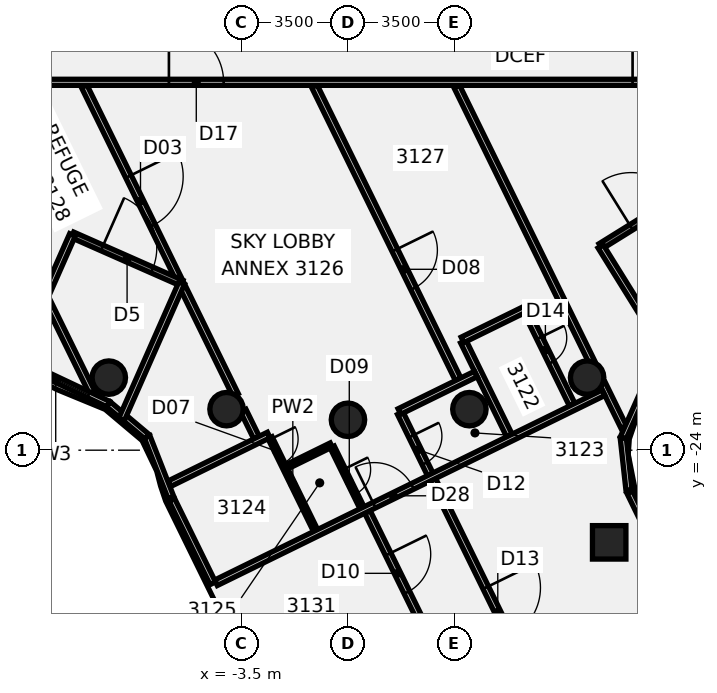
"""IFC4 building model, lengths in metres.
Left out: names, types, materials, properties, quantities, classifications, styles, units other than length and angle.
Written with IfcOpenShell. Run it as: python <this file> out.ifc"""

import sys

from ifc_helpers import new_model, si_unit, direction, frame, frame_2d, origin, origin_2d, place, context, subcontext, project, spatial, rectangle, circle, extrude, element, fill, save


model = new_model("IFC4")
c1 = context("Model", 3, precision=1e-05, world=origin(), true_north=direction((0.0, 1.0)))
c2 = subcontext(c1, "Body", "Model", "MODEL_VIEW")
j1 = project(units=[si_unit("LENGTHUNIT", "METRE"), si_unit("PLANEANGLEUNIT", "RADIAN")], contexts=[c1])
p1 = place(None, origin())
s1 = spatial("IfcSite", under=j1, at=p1, CompositionType="ELEMENT")
p2 = place(p1, origin())
s2 = spatial("IfcBuilding", under=s1, at=p2, CompositionType="ELEMENT")
p3 = place(p2, frame((0.0, 0.0, 128.5)))
s3 = spatial("IfcBuildingStorey", under=s2, at=p3, CompositionType="ELEMENT", Elevation=128.5)
for number, where, z_axis, x_axis in (
    (1, (-7.866, -21.613, -0.18), (0.0, 0.0, 1.0), (1.0, 0.0, 0.0)),
    (2, (-3.994, -22.651, -0.18), (0.0, 0.0, 1.0), (1.0, 0.0, 0.0)),
    (3, (0.0, -23.0, -0.18), (0.0, 0.0, 1.0), (1.0, 0.0, 0.0)),
    (4, (3.994, -22.651, -0.18), (0.0, 0.0, 1.0), (1.0, 0.0, 0.0)),
    (5, (7.866, -21.613, -0.18), (0.0, 0.0, 1.0), (1.0, 0.0, 0.0)),
):
    element("IfcColumn", number, at=place(p3, frame(where, z_axis=z_axis, x_axis=x_axis)), inside=s3, PredefinedType="COLUMN", context=c2, shape_type="SweptSolid", body=[
        extrude(circle(Radius=0.55, at=origin_2d()), origin(), (0.0, 0.0, 1.0), 4.54),
    ])
p4 = place(p3, frame((8.593, -27.031, -0.176), z_axis=(0.019865586913, 0.034670563609, 0.999201336306), x_axis=(-0.897427963586, -0.439917045338, 0.033106546108)))
e6 = element("IfcColumn", 6, at=p4, inside=s3, PredefinedType="COLUMN", context=c2, shape_type="SweptSolid", body=[
    extrude(rectangle(XDim=1.1, YDim=1.1, at=origin_2d()), origin(), (0.0, 0.0, 1.0), 4.535),
])
p5 = place(p3, frame((-12.961, -12.83, 0.0), z_axis=(0.0, 0.0, 1.0), x_axis=(0.44020582269, -0.897896894788, 0.0)))
e7 = element("IfcWall", 7, at=p5, inside=s3, PredefinedType="PARTITIONING", context=c2, shape_type="SweptSolid", body=[
    extrude(rectangle(XDim=10.402, YDim=0.2, at=frame_2d((5.201, 0.0))), origin(), (0.0, 0.0, 1.0), 3.66),
])
p6 = place(p3, frame((-8.677, -12.026, 0.0), z_axis=(0.0, 0.0, 1.0), x_axis=(0.440258895861, -0.897870873018, 0.0)))
e8 = element("IfcWall", 8, at=p6, inside=s3, PredefinedType="PARTITIONING", context=c2, shape_type="SweptSolid", body=[
    extrude(rectangle(XDim=11.312, YDim=0.2, at=frame_2d((5.656, 0.0))), origin(), (0.0, 0.0, 1.0), 3.66),
])
p7 = place(p6, frame((3.31, 0.0, 0.0)))
e9 = element("IfcOpeningElement", 9, at=p7, cuts=e8, PredefinedType="OPENING", context=c2, shape_type="SweptSolid", body=[
    extrude(rectangle(XDim=1.8, YDim=2.1, at=frame_2d((0.9, 1.05))), frame((0.0, 0.11, 0.0), z_axis=(0.0, -1.0, 0.0), x_axis=(1.0, 0.0, 0.0)), (0.0, 0.0, 1.0), 0.22),
])
p8 = place(p3, frame((-3.446, -22.695, 0.0), z_axis=(0.0, 0.0, 1.0), x_axis=(0.440211677145, -0.89789402454, 0.0)))
e10 = element("IfcWall", 10, at=p8, inside=s3, PredefinedType="PARTITIONING", context=c2, shape_type="SweptSolid", body=[
    extrude(rectangle(XDim=0.992, YDim=0.2, at=frame_2d((0.496, 0.0))), origin(), (0.0, 0.0, 1.0), 3.66),
])
p9 = place(p3, frame((-2.562, -23.59, 0.0), z_axis=(0.0, 0.0, 1.0), x_axis=(0.440221907821, -0.897889008661, 0.0)))
e11 = element("IfcWall", 11, at=p9, inside=s3, PredefinedType="PARTITIONING", context=c2, shape_type="SweptSolid", body=[
    extrude(rectangle(XDim=3.401, YDim=0.15, at=frame_2d((1.7, 0.0))), origin(), (0.0, 0.0, 1.0), 3.66),
])
p10 = place(p9, frame((0.05, 0.0, 0.0)))
e12 = element("IfcOpeningElement", 12, at=p10, cuts=e11, PredefinedType="OPENING", context=c2, shape_type="SweptSolid", body=[
    extrude(rectangle(XDim=0.9, YDim=2.1, at=frame_2d((0.45, 1.05))), frame((0.0, 0.085, 0.0), z_axis=(0.0, -1.0, 0.0), x_axis=(1.0, 0.0, 0.0)), (0.0, 0.0, 1.0), 0.17),
])
p11 = place(p3, frame((-1.104, -12.026, 0.0), z_axis=(0.0, 0.0, 1.0), x_axis=(0.44028770211, -0.897856747689, 0.0)))
e13 = element("IfcWall", 13, at=p11, inside=s3, PredefinedType="PARTITIONING", context=c2, shape_type="SweptSolid", body=[
    extrude(rectangle(XDim=10.737, YDim=0.2, at=frame_2d((5.368, 0.0))), origin(), (0.0, 0.0, 1.0), 3.66),
])
p12 = place(p11, frame((6.01, 0.0, 0.0)))
e14 = element("IfcOpeningElement", 14, at=p12, cuts=e13, PredefinedType="OPENING", context=c2, shape_type="SweptSolid", body=[
    extrude(rectangle(XDim=1.4, YDim=2.1, at=frame_2d((0.7, 1.05))), frame((0.0, 0.11, 0.0), z_axis=(0.0, -1.0, 0.0), x_axis=(1.0, 0.0, 0.0)), (0.0, 0.0, 1.0), 0.22),
])
p13 = place(p3, frame((-0.518, -23.896, 0.0), z_axis=(0.0, 0.0, 1.0), x_axis=(0.440354919773, -0.897823782616, 0.0)))
e15 = element("IfcWall", 15, at=p13, inside=s3, PredefinedType="PARTITIONING", context=c2, shape_type="SweptSolid", body=[
    extrude(rectangle(XDim=2.225, YDim=0.15, at=frame_2d((1.113, 0.0))), origin(), (0.0, 0.0, 1.0), 3.66),
])
p14 = place(p13, frame((0.825, 0.0, 0.0)))
e16 = element("IfcOpeningElement", 16, at=p14, cuts=e15, PredefinedType="OPENING", context=c2, shape_type="SweptSolid", body=[
    extrude(rectangle(XDim=0.9, YDim=2.1, at=frame_2d((0.45, 1.05))), frame((0.0, 0.085, 0.0), z_axis=(0.0, -1.0, 0.0), x_axis=(1.0, 0.0, 0.0)), (0.0, 0.0, 1.0), 0.17),
])
p15 = place(p3, frame((0.64, -26.03, 0.0), z_axis=(0.0, 0.0, 1.0), x_axis=(0.440242212753, -0.897879053164, 0.0)))
e17 = element("IfcWall", 17, at=p15, inside=s3, PredefinedType="PARTITIONING", context=c2, shape_type="SweptSolid", body=[
    extrude(rectangle(XDim=3.86, YDim=0.2, at=frame_2d((1.93, 0.0))), origin(), (0.0, 0.0, 1.0), 3.66),
])
p16 = place(p15, frame((1.55, 0.0, 0.0)))
e18 = element("IfcOpeningElement", 18, at=p16, cuts=e17, PredefinedType="OPENING", context=c2, shape_type="SweptSolid", body=[
    extrude(rectangle(XDim=1.4, YDim=2.1, at=frame_2d((0.7, 1.05))), frame((0.0, 0.11, 0.0), z_axis=(0.0, -1.0, 0.0), x_axis=(1.0, 0.0, 0.0)), (0.0, 0.0, 1.0), 0.22),
])
p17 = place(p3, frame((1.72, -22.783, 0.0), z_axis=(0.0, 0.0, 1.0), x_axis=(0.440033133993, -0.897981537109, 0.0)))
e19 = element("IfcWall", 19, at=p17, inside=s3, PredefinedType="PARTITIONING", context=c2, shape_type="SweptSolid", body=[
    extrude(rectangle(XDim=15.74, YDim=0.2, at=frame_2d((7.87, 0.0))), origin(), (0.0, 0.0, 1.0), 3.66),
])
p18 = place(p17, frame((0.84, 0.0, 0.0)))
e20 = element("IfcOpeningElement", 20, at=p18, cuts=e19, PredefinedType="OPENING", context=c2, shape_type="SweptSolid", body=[
    extrude(rectangle(XDim=1.0, YDim=2.1, at=frame_2d((0.5, 1.05))), frame((0.0, 0.11, 0.0), z_axis=(0.0, -1.0, 0.0), x_axis=(1.0, 0.0, 0.0)), (0.0, 0.0, 1.0), 0.22),
])
p19 = place(p17, frame((6.39, 0.0, 0.0)))
e21 = element("IfcOpeningElement", 21, at=p19, cuts=e19, PredefinedType="OPENING", context=c2, shape_type="SweptSolid", body=[
    extrude(rectangle(XDim=1.8, YDim=2.1, at=frame_2d((0.9, 1.05))), frame((0.0, 0.11, 0.0), z_axis=(0.0, -1.0, 0.0), x_axis=(1.0, 0.0, 0.0)), (0.0, 0.0, 1.0), 0.22),
])
p20 = place(p3, frame((3.573, -12.026, 0.0), z_axis=(0.0, 0.0, 1.0), x_axis=(0.440287137064, -0.897857024774, 0.0)))
e22 = element("IfcWall", 22, at=p20, inside=s3, PredefinedType="PARTITIONING", context=c2, shape_type="SweptSolid", body=[
    extrude(rectangle(XDim=10.1, YDim=0.2, at=frame_2d((5.05, 0.0))), origin(), (0.0, 0.0, 1.0), 3.66),
])
p21 = place(p3, frame((8.373, -21.813, 0.0), z_axis=(0.0, 0.0, 1.0), x_axis=(0.440361746676, -0.897820434199, 0.0)))
e23 = element("IfcWall", 23, at=p21, inside=s3, PredefinedType="PARTITIONING", context=c2, shape_type="SweptSolid", body=[
    extrude(rectangle(XDim=1.585, YDim=0.2, at=frame_2d((0.792, 0.0))), origin(), (0.0, 0.0, 1.0), 3.66),
])
p22 = place(p3, frame((3.795, -20.429, 0.0), z_axis=(0.0, 0.0, 1.0), x_axis=(0.440215566353, -0.897892117763, 0.0)))
e24 = element("IfcWall", 24, at=p22, inside=s3, PredefinedType="PARTITIONING", context=c2, shape_type="SweptSolid", body=[
    extrude(rectangle(XDim=3.44, YDim=0.2, at=frame_2d((1.72, 0.0))), origin(), (0.0, 0.0, 1.0), 3.66),
])
p23 = place(p3, frame((5.878, -19.452, 0.0), z_axis=(0.0, 0.0, 1.0), x_axis=(0.440363832192, -0.897819411295, 0.0)))
e25 = element("IfcWall", 25, at=p23, inside=s3, PredefinedType="PARTITIONING", context=c2, shape_type="SweptSolid", body=[
    extrude(rectangle(XDim=3.4, YDim=0.2, at=frame_2d((1.7, 0.0))), origin(), (0.0, 0.0, 1.0), 3.66),
])
p24 = place(p23, frame((0.95, 0.0, 0.0)))
e26 = element("IfcOpeningElement", 26, at=p24, cuts=e25, PredefinedType="OPENING", context=c2, shape_type="SweptSolid", body=[
    extrude(rectangle(XDim=0.9, YDim=2.1, at=frame_2d((0.45, 1.05))), frame((0.0, 0.11, 0.0), z_axis=(0.0, -1.0, 0.0), x_axis=(1.0, 0.0, 0.0)), (0.0, 0.0, 1.0), 0.22),
])
p25 = place(p3, frame((-17.1, -11.9, 0.0), z_axis=(0.0, 0.0, 1.0), x_axis=(1.0, 0.0, 0.0)))
e27 = element("IfcWall", 27, at=p25, inside=s3, PredefinedType="PARTITIONING", context=c2, shape_type="SweptSolid", body=[
    extrude(rectangle(XDim=34.145, YDim=0.2, at=frame_2d((17.073, 0.0))), origin(), (0.0, 0.0, 1.0), 3.66),
])
p26 = place(p25, frame((11.211, 0.0, 0.0)))
e28 = element("IfcOpeningElement", 28, at=p26, cuts=e27, PredefinedType="OPENING", context=c2, shape_type="SweptSolid", body=[
    extrude(rectangle(XDim=1.8, YDim=2.1, at=frame_2d((0.9, 1.05))), frame((0.0, 0.11, 0.0), z_axis=(0.0, -1.0, 0.0), x_axis=(1.0, 0.0, 0.0)), (0.0, 0.0, 1.0), 0.22),
])
p27 = place(p25, frame((2.1, 0.0, 0.0)))
e29 = element("IfcOpeningElement", 29, at=p27, cuts=e27, PredefinedType="OPENING", context=c2, shape_type="SweptSolid", body=[
    extrude(rectangle(XDim=1.8, YDim=2.1, at=frame_2d((0.9, 1.05))), frame((0.0, 0.11, 0.0), z_axis=(0.0, -1.0, 0.0), x_axis=(1.0, 0.0, 0.0)), (0.0, 0.0, 1.0), 0.22),
])
p28 = place(p25, frame((26.462, 0.0, 0.0)))
e30 = element("IfcOpeningElement", 30, at=p28, cuts=e27, PredefinedType="OPENING", context=c2, shape_type="SweptSolid", body=[
    extrude(rectangle(XDim=1.8, YDim=2.1, at=frame_2d((0.9, 1.05))), frame((0.0, 0.11, 0.0), z_axis=(0.0, -1.0, 0.0), x_axis=(1.0, 0.0, 0.0)), (0.0, 0.0, 1.0), 0.22),
])
p29 = place(p3, frame((-5.87, -25.102, 0.0), z_axis=(0.0, 0.0, 1.0), x_axis=(0.897759350726, 0.440486263333, 0.0)))
e31 = element("IfcWall", 31, at=p29, inside=s3, PredefinedType="PARTITIONING", context=c2, shape_type="SweptSolid", body=[
    extrude(rectangle(XDim=3.636, YDim=0.2, at=frame_2d((1.818, 0.0))), origin(), (0.0, 0.0, 1.0), 3.66),
])
p30 = place(p3, frame((3.768, -20.373, 0.0), z_axis=(0.0, 0.0, 1.0), x_axis=(0.897798121092, 0.440407236275, 0.0)))
e32 = element("IfcWall", 32, at=p30, inside=s3, PredefinedType="PARTITIONING", context=c2, shape_type="SweptSolid", body=[
    extrude(rectangle(XDim=2.3, YDim=0.2, at=frame_2d((1.15, 0.0))), origin(), (0.0, 0.0, 1.0), 3.66),
])
p31 = place(p3, frame((-4.342, -28.361, 0.0), z_axis=(0.0, 0.0, 1.0), x_axis=(0.89785648862, 0.440288230416, 0.0)))
e33 = element("IfcWall", 33, at=p31, inside=s3, PredefinedType="PARTITIONING", context=c2, shape_type="SweptSolid", body=[
    extrude(rectangle(XDim=14.199, YDim=0.2, at=frame_2d((7.1, 0.0))), origin(), (0.0, 0.0, 1.0), 3.66),
])
p32 = place(p31, frame((5.8, 0.0, 0.0)))
e34 = element("IfcOpeningElement", 34, at=p32, cuts=e33, PredefinedType="OPENING", context=c2, shape_type="SweptSolid", body=[
    extrude(rectangle(XDim=1.4, YDim=2.1, at=frame_2d((0.7, 1.05))), frame((0.0, 0.11, 0.0), z_axis=(0.0, -1.0, 0.0), x_axis=(1.0, 0.0, 0.0)), (0.0, 0.0, 1.0), 0.22),
])
p33 = place(p3, frame((-2.01, -24.545, 0.0), z_axis=(0.0, 0.0, 1.0), x_axis=(0.897737840771, 0.440530100275, 0.0)))
e35 = element("IfcWall", 35, at=p33, inside=s3, PredefinedType="PARTITIONING", context=c2, shape_type="SweptSolid", body=[
    extrude(rectangle(XDim=1.625, YDim=0.15, at=frame_2d((0.812, 0.0))), origin(), (0.0, 0.0, 1.0), 3.66),
])
p34 = place(p3, frame((1.693, -22.728, 0.0), z_axis=(0.0, 0.0, 1.0), x_axis=(0.897682035741, 0.440643804799, 0.0)))
e36 = element("IfcWall", 36, at=p34, inside=s3, PredefinedType="PARTITIONING", context=c2, shape_type="SweptSolid", body=[
    extrude(rectangle(XDim=2.8, YDim=0.2, at=frame_2d((1.4, 0.0))), origin(), (0.0, 0.0, 1.0), 3.66),
])
p35 = place(p3, frame((-11.865, -20.605, 0.0), z_axis=(0.0, 0.0, 1.0), x_axis=(0.904385974053, -0.426715373448, 0.0)))
e37 = element("IfcWall", 37, at=p35, inside=s3, PredefinedType="SOLIDWALL", context=c2, shape_type="SweptSolid", body=[
    extrude(rectangle(XDim=4.403, YDim=0.2, at=frame_2d((2.202, 0.0))), origin(), (0.0, 0.0, 1.0), 4.36),
])
p36 = place(p35, frame((1.29, 0.0, 1.4)))
e38 = element("IfcOpeningElement", 38, at=p36, cuts=e37, PredefinedType="OPENING", context=c2, shape_type="SweptSolid", body=[
    extrude(rectangle(XDim=2.4, YDim=2.1, at=frame_2d((1.2, 1.05))), frame((0.0, 0.11, 0.0), z_axis=(0.0, -1.0, 0.0), x_axis=(1.0, 0.0, 0.0)), (0.0, 0.0, 1.0), 0.22),
])
p37 = place(p3, frame((-7.882, -22.484, 0.0), z_axis=(0.0, 0.0, 1.0), x_axis=(0.765040402091, -0.643982284825, 0.0)))
e39 = element("IfcWall", 39, at=p37, inside=s3, PredefinedType="SOLIDWALL", context=c2, shape_type="SweptSolid", body=[
    extrude(rectangle(XDim=1.666, YDim=0.2, at=frame_2d((0.833, 0.0))), origin(), (0.0, 0.0, 1.0), 4.36),
])
p38 = place(p3, frame((-6.608, -23.557, 0.0), z_axis=(0.0, 0.0, 1.0), x_axis=(0.364931951145, -0.931034194342, 0.0)))
e40 = element("IfcWall", 40, at=p38, inside=s3, PredefinedType="SOLIDWALL", context=c2, shape_type="SweptSolid", body=[
    extrude(rectangle(XDim=2.16, YDim=0.2, at=frame_2d((1.08, 0.0))), origin(), (0.0, 0.0, 1.0), 4.36),
])
p39 = place(p3, frame((-5.792, -25.632, 0.0), z_axis=(0.0, 0.0, 1.0), x_axis=(0.440299885466, -0.897850773157, 0.0)))
e41 = element("IfcWall", 41, at=p39, inside=s3, PredefinedType="SOLIDWALL", context=c2, shape_type="SweptSolid", body=[
    extrude(rectangle(XDim=3.057, YDim=0.2, at=frame_2d((1.528, 0.0))), origin(), (0.0, 0.0, 1.0), 4.36),
])
p40 = place(p3, frame((17.25, -41.735, 0.0), z_axis=(0.0, 0.0, 1.0), x_axis=(-0.43857585016, 0.898694176935, 0.0)))
e42 = element("IfcWall", 42, at=p40, inside=s3, PredefinedType="SOLIDWALL", context=c2, shape_type="SweptSolid", body=[
    extrude(rectangle(XDim=18.201, YDim=0.2, at=frame_2d((9.1, 0.0))), origin(), (0.0, 0.0, 1.0), 4.36),
])
p41 = place(p40, frame((9.091, 0.0, 1.4)))
e43 = element("IfcOpeningElement", 43, at=p41, cuts=e42, PredefinedType="OPENING", context=c2, shape_type="SweptSolid", body=[
    extrude(rectangle(XDim=2.4, YDim=2.1, at=frame_2d((1.2, 1.05))), frame((0.0, 0.11, 0.0), z_axis=(0.0, -1.0, 0.0), x_axis=(1.0, 0.0, 0.0)), (0.0, 0.0, 1.0), 0.22),
])
p42 = place(p3, frame((9.244, -25.313, 0.0), z_axis=(0.0, 0.0, 1.0), x_axis=(-0.109471500068, 0.993989934895, 0.0)))
e44 = element("IfcWall", 44, at=p42, inside=s3, PredefinedType="SOLIDWALL", context=c2, shape_type="SweptSolid", body=[
    extrude(rectangle(XDim=1.731, YDim=0.2, at=frame_2d((0.865, 0.0))), origin(), (0.0, 0.0, 1.0), 4.36),
])
p43 = place(p3, frame((9.055, -23.593, 0.0), z_axis=(0.0, 0.0, 1.0), x_axis=(0.407568379485, 0.913174690869, 0.0)))
e45 = element("IfcWall", 45, at=p43, inside=s3, PredefinedType="SOLIDWALL", context=c2, shape_type="SweptSolid", body=[
    extrude(rectangle(XDim=1.631, YDim=0.2, at=frame_2d((0.815, 0.0))), origin(), (0.0, 0.0, 1.0), 4.36),
])
p44 = place(p3, frame((8.311, -17.295, 0.0), z_axis=(0.0, 0.0, 1.0), x_axis=(0.849445624751, 0.52767616072, 0.0)))
e46 = element("IfcWall", 46, at=p44, inside=s3, PredefinedType="SOLIDWALL", context=c2, shape_type="SweptSolid", body=[
    extrude(rectangle(XDim=4.17, YDim=0.2, at=frame_2d((2.085, 0.0))), origin(), (0.0, 0.0, 1.0), 4.36),
])
p45 = place(p44, frame((1.185, 0.0, 0.0)))
e47 = element("IfcOpeningElement", 47, at=p45, cuts=e46, PredefinedType="OPENING", context=c2, shape_type="SweptSolid", body=[
    extrude(rectangle(XDim=1.8, YDim=2.4, at=frame_2d((0.9, 1.2))), frame((0.0, 0.11, 0.0), z_axis=(0.0, -1.0, 0.0), x_axis=(1.0, 0.0, 0.0)), (0.0, 0.0, 1.0), 0.22),
])
p46 = place(p3, frame((8.311, -17.295, 0.0), z_axis=(0.0, 0.0, 1.0), x_axis=(0.527712449553, -0.84942308103, 0.0)))
e48 = element("IfcWall", 48, at=p46, inside=s3, PredefinedType="SOLIDWALL", context=c2, shape_type="SweptSolid", body=[
    extrude(rectangle(XDim=4.745, YDim=0.2, at=frame_2d((2.373, 0.0))), origin(), (0.0, 0.0, 1.0), 4.36),
])
p47 = place(p3, frame((-9.061, -16.918, 0.0), z_axis=(0.0, 0.0, 1.0), x_axis=(0.914869848832, -0.403748881978, 0.0)))
e49 = element("IfcWall", 49, at=p47, inside=s3, PredefinedType="SOLIDWALL", context=c2, shape_type="SweptSolid", body=[
    extrude(rectangle(XDim=3.927, YDim=0.2, at=frame_2d((1.963, 0.0))), origin(), (0.0, 0.0, 1.0), 4.36),
])
p48 = place(p47, frame((1.063, 0.0, 0.0)))
e50 = element("IfcOpeningElement", 50, at=p48, cuts=e49, PredefinedType="OPENING", context=c2, shape_type="SweptSolid", body=[
    extrude(rectangle(XDim=1.8, YDim=2.4, at=frame_2d((0.9, 1.2))), frame((0.0, 0.11, 0.0), z_axis=(0.0, -1.0, 0.0), x_axis=(1.0, 0.0, 0.0)), (0.0, 0.0, 1.0), 0.22),
])
p49 = place(p3, frame((-9.062, -16.918, 0.0), z_axis=(0.0, 0.0, 1.0), x_axis=(-0.403733506443, -0.914876634184, 0.0)))
e51 = element("IfcWall", 51, at=p49, inside=s3, PredefinedType="SOLIDWALL", context=c2, shape_type="SweptSolid", body=[
    extrude(rectangle(XDim=4.703, YDim=0.2, at=frame_2d((2.352, 0.0))), origin(), (0.0, 0.0, 1.0), 4.36),
])
p50 = place(p3, frame((-5.469, -18.503, 0.0), z_axis=(0.0, 0.0, 1.0), x_axis=(-0.403691721509, -0.914895072664, 0.0)))
e52 = element("IfcWall", 52, at=p50, inside=s3, PredefinedType="SOLIDWALL", context=c2, shape_type="SweptSolid", body=[
    extrude(rectangle(XDim=4.9, YDim=0.2, at=frame_2d((2.45, 0.0))), origin(), (0.0, 0.0, 1.0), 4.36),
])
p51 = place(p7, frame((1.8, 0.0, 0.0), z_axis=(0.0, 0.0, 1.0), x_axis=(-1.0, 0.0, 0.0)))
e53 = element("IfcDoor", 53, at=p51, inside=s3, OperationType="DOUBLE_DOOR_SINGLE_SWING", PredefinedType="DOOR", context=c2, shape_type="SweptSolid", body=[
    extrude(rectangle(XDim=1.8, YDim=2.1, at=frame_2d((0.9, 1.05))), frame((0.0, 0.025, 0.0), z_axis=(0.0, -1.0, 0.0), x_axis=(1.0, 0.0, 0.0)), (0.0, 0.0, 1.0), 0.05),
])
fill(e9, e53)
p52 = place(p10, frame((0.9, 0.0, 0.0), z_axis=(0.0, 0.0, 1.0), x_axis=(-1.0, 0.0, 0.0)))
e54 = element("IfcDoor", 54, at=p52, inside=s3, OperationType="SINGLE_SWING_LEFT", PredefinedType="DOOR", context=c2, shape_type="SweptSolid", body=[
    extrude(rectangle(XDim=0.9, YDim=2.1, at=frame_2d((0.45, 1.05))), frame((0.0, 0.025, 0.0), z_axis=(0.0, -1.0, 0.0), x_axis=(1.0, 0.0, 0.0)), (0.0, 0.0, 1.0), 0.05),
])
fill(e12, e54)
p53 = place(p12, origin())
e55 = element("IfcDoor", 55, at=p53, inside=s3, OperationType="DOUBLE_DOOR_SINGLE_SWING", PredefinedType="DOOR", context=c2, shape_type="SweptSolid", body=[
    extrude(rectangle(XDim=1.4, YDim=2.1, at=frame_2d((0.7, 1.05))), frame((0.0, 0.025, 0.0), z_axis=(0.0, -1.0, 0.0), x_axis=(1.0, 0.0, 0.0)), (0.0, 0.0, 1.0), 0.05),
])
fill(e14, e55)
p54 = place(p14, frame((0.9, 0.0, 0.0), z_axis=(0.0, 0.0, 1.0), x_axis=(-1.0, 0.0, 0.0)))
e56 = element("IfcDoor", 56, at=p54, inside=s3, OperationType="SINGLE_SWING_RIGHT", PredefinedType="DOOR", context=c2, shape_type="SweptSolid", body=[
    extrude(rectangle(XDim=0.9, YDim=2.1, at=frame_2d((0.45, 1.05))), frame((0.0, 0.025, 0.0), z_axis=(0.0, -1.0, 0.0), x_axis=(1.0, 0.0, 0.0)), (0.0, 0.0, 1.0), 0.05),
])
fill(e16, e56)
p55 = place(p16, frame((1.4, 0.0, 0.0), z_axis=(0.0, 0.0, 1.0), x_axis=(-1.0, 0.0, 0.0)))
e57 = element("IfcDoor", 57, at=p55, inside=s3, OperationType="DOUBLE_DOOR_SINGLE_SWING", PredefinedType="DOOR", context=c2, shape_type="SweptSolid", body=[
    extrude(rectangle(XDim=1.4, YDim=2.1, at=frame_2d((0.7, 1.05))), frame((0.0, 0.025, 0.0), z_axis=(0.0, -1.0, 0.0), x_axis=(1.0, 0.0, 0.0)), (0.0, 0.0, 1.0), 0.05),
])
fill(e18, e57)
p56 = place(p18, origin())
e58 = element("IfcDoor", 58, at=p56, inside=s3, OperationType="SINGLE_SWING_RIGHT", PredefinedType="DOOR", context=c2, shape_type="SweptSolid", body=[
    extrude(rectangle(XDim=1.0, YDim=2.1, at=frame_2d((0.5, 1.05))), frame((0.0, 0.025, 0.0), z_axis=(0.0, -1.0, 0.0), x_axis=(1.0, 0.0, 0.0)), (0.0, 0.0, 1.0), 0.05),
])
fill(e20, e58)
p57 = place(p19, origin())
e59 = element("IfcDoor", 59, at=p57, inside=s3, OperationType="DOUBLE_DOOR_SINGLE_SWING", PredefinedType="DOOR", context=c2, shape_type="SweptSolid", body=[
    extrude(rectangle(XDim=1.8, YDim=2.1, at=frame_2d((0.9, 1.05))), frame((0.0, 0.025, 0.0), z_axis=(0.0, -1.0, 0.0), x_axis=(1.0, 0.0, 0.0)), (0.0, 0.0, 1.0), 0.05),
])
fill(e21, e59)
p58 = place(p24, frame((0.9, 0.0, 0.0), z_axis=(0.0, 0.0, 1.0), x_axis=(-1.0, 0.0, 0.0)))
e60 = element("IfcDoor", 60, at=p58, inside=s3, OperationType="SINGLE_SWING_LEFT", PredefinedType="DOOR", context=c2, shape_type="SweptSolid", body=[
    extrude(rectangle(XDim=0.9, YDim=2.1, at=frame_2d((0.45, 1.05))), frame((0.0, 0.025, 0.0), z_axis=(0.0, -1.0, 0.0), x_axis=(1.0, 0.0, 0.0)), (0.0, 0.0, 1.0), 0.05),
])
fill(e26, e60)
p59 = place(p26, origin())
e61 = element("IfcDoor", 61, at=p59, inside=s3, OperationType="DOUBLE_DOOR_SINGLE_SWING", PredefinedType="DOOR", context=c2, shape_type="SweptSolid", body=[
    extrude(rectangle(XDim=1.8, YDim=2.1, at=frame_2d((0.9, 1.05))), frame((0.0, 0.025, 0.0), z_axis=(0.0, -1.0, 0.0), x_axis=(1.0, 0.0, 0.0)), (0.0, 0.0, 1.0), 0.05),
])
fill(e28, e61)
p60 = place(p28, frame((1.8, 0.0, 0.0), z_axis=(0.0, 0.0, 1.0), x_axis=(-1.0, 0.0, 0.0)))
e62 = element("IfcDoor", 62, at=p60, inside=s3, OperationType="DOUBLE_DOOR_SINGLE_SWING", PredefinedType="DOOR", context=c2, shape_type="SweptSolid", body=[
    extrude(rectangle(XDim=1.8, YDim=2.1, at=frame_2d((0.9, 1.05))), frame((0.0, 0.025, 0.0), z_axis=(0.0, -1.0, 0.0), x_axis=(1.0, 0.0, 0.0)), (0.0, 0.0, 1.0), 0.05),
])
fill(e30, e62)
p61 = place(p32, origin())
e63 = element("IfcDoor", 63, at=p61, inside=s3, OperationType="DOUBLE_DOOR_SINGLE_SWING", PredefinedType="DOOR", context=c2, shape_type="SweptSolid", body=[
    extrude(rectangle(XDim=1.4, YDim=2.1, at=frame_2d((0.7, 1.05))), frame((0.0, 0.025, 0.0), z_axis=(0.0, -1.0, 0.0), x_axis=(1.0, 0.0, 0.0)), (0.0, 0.0, 1.0), 0.05),
])
fill(e34, e63)
p62 = place(p36, origin())
e64 = element("IfcWindow", 64, at=p62, inside=s3, PartitioningType="SINGLE_PANEL", PredefinedType="WINDOW", context=c2, shape_type="SweptSolid", body=[
    extrude(rectangle(XDim=2.4, YDim=2.1, at=frame_2d((1.2, 1.05))), frame((0.0, 0.03, 0.0), z_axis=(0.0, -1.0, 0.0), x_axis=(1.0, 0.0, 0.0)), (0.0, 0.0, 1.0), 0.06),
])
fill(e38, e64)
p63 = place(p45, origin())
e65 = element("IfcDoor", 65, at=p63, inside=s3, OperationType="SINGLE_SWING_LEFT", PredefinedType="DOOR", context=c2, shape_type="SweptSolid", body=[
    extrude(rectangle(XDim=1.8, YDim=2.4, at=frame_2d((0.9, 1.2))), frame((0.0, 0.025, 0.0), z_axis=(0.0, -1.0, 0.0), x_axis=(1.0, 0.0, 0.0)), (0.0, 0.0, 1.0), 0.05),
])
fill(e47, e65)
p64 = place(p48, origin())
e66 = element("IfcDoor", 66, at=p64, inside=s3, OperationType="SINGLE_SWING_LEFT", PredefinedType="DOOR", context=c2, shape_type="SweptSolid", body=[
    extrude(rectangle(XDim=1.8, YDim=2.4, at=frame_2d((0.9, 1.2))), frame((0.0, 0.025, 0.0), z_axis=(0.0, -1.0, 0.0), x_axis=(1.0, 0.0, 0.0)), (0.0, 0.0, 1.0), 0.05),
])
fill(e50, e66)
save(model, sys.argv[1])
